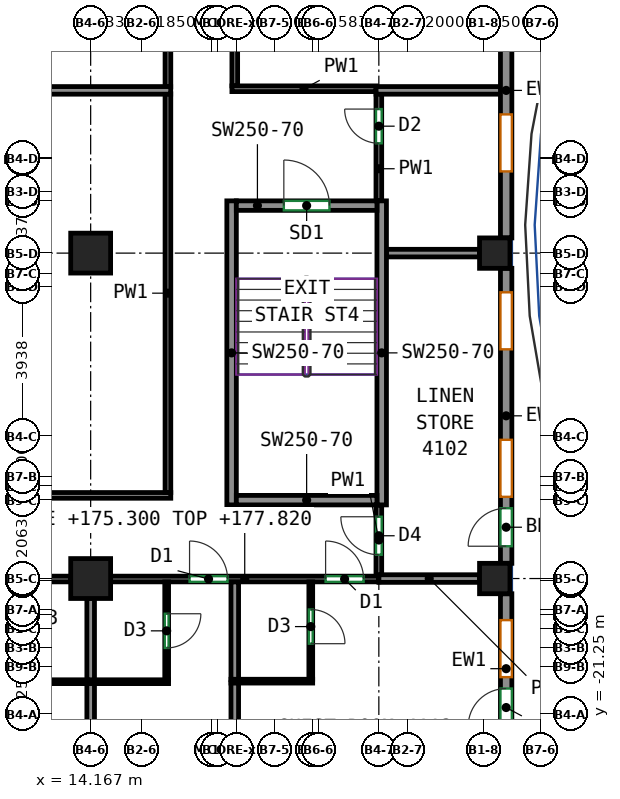
"""IFC4 building model, lengths in metres.
Left out: names, types, materials, properties, quantities, classifications, styles, units other than length and angle.
Written with IfcOpenShell. Run it as: python <this file> out.ifc"""

import sys

from ifc_helpers import new_model, si_unit, direction, frame, frame_2d, origin, origin_2d, place, context, subcontext, project, spatial, rectangle, extrude, source, transform, mapped, element, fill, save


model = new_model("IFC4")
c1 = context("Model", 3, precision=1e-05, world=origin(), true_north=direction((0.0, 1.0)))
c2 = subcontext(c1, "Body", "Model", "MODEL_VIEW")
j1 = project(units=[si_unit("LENGTHUNIT", "METRE"), si_unit("PLANEANGLEUNIT", "RADIAN")], contexts=[c1])
p1 = place(None, origin())
s1 = spatial("IfcSite", under=j1, at=p1, CompositionType="ELEMENT")
p2 = place(p1, origin())
s2 = spatial("IfcBuilding", under=s1, at=p2, CompositionType="ELEMENT")
p3 = place(p2, frame((0.0, 0.0, 175.3)))
s3 = spatial("IfcBuildingStorey", under=s2, at=p3, CompositionType="ELEMENT", Elevation=175.3)
m1 = source(origin(), c2, "Body", "SweptSolid", [
    extrude(rectangle(XDim=1.05, YDim=1.05, at=origin_2d()), origin(), (0.0, 0.0, 1.0), 3.12),
])
for number, where, z_axis, x_axis in (
    (1, (14.167, -17.688, 0.0), (0.0, 0.0, 1.0), (1.0, 0.0, 0.0)),
    (2, (14.167, -9.125, 0.0), (0.0, 0.0, 1.0), (1.0, 0.0, 0.0)),
):
    element("IfcColumn", number, at=place(p3, frame(where, z_axis=z_axis, x_axis=x_axis)), inside=s3, PredefinedType="COLUMN", context=c2, shape_type="MappedRepresentation", body=[
        mapped(m1, transform((0.0, 0.0, 0.0))),
    ])
m2 = source(origin(), c2, "Body", "SweptSolid", [
    extrude(rectangle(XDim=0.8, YDim=0.8, at=origin_2d()), origin(), (0.0, 0.0, 1.0), 3.12),
])
for number, where, z_axis, x_axis in (
    (3, (24.8, -17.688, 0.0), (0.0, 0.0, 1.0), (1.0, 0.0, 0.0)),
    (4, (24.8, -9.125, 0.0), (0.0, 0.0, 1.0), (1.0, 0.0, 0.0)),
):
    element("IfcColumn", number, at=place(p3, frame(where, z_axis=z_axis, x_axis=x_axis)), inside=s3, PredefinedType="COLUMN", context=c2, shape_type="MappedRepresentation", body=[
        mapped(m2, transform((0.0, 0.0, 0.0))),
    ])
m3 = source(origin(), c2, "Body", "SweptSolid", [
    extrude(rectangle(XDim=8.0, YDim=0.25, at=frame_2d((4.0, 0.0))), origin(), (0.0, 0.0, 1.0), 3.12),
])
for number, where, z_axis, x_axis in (
    (5, (17.875, -15.75, 0.0), (0.0, 0.0, 1.0), (0.0, 1.0, 0.0)),
    (6, (21.825, -15.75, 0.0), (0.0, 0.0, 1.0), (0.0, 1.0, 0.0)),
):
    element("IfcWall", number, at=place(p3, frame(where, z_axis=z_axis, x_axis=x_axis)), inside=s3, PredefinedType="SHEAR", context=c2, shape_type="MappedRepresentation", body=[
        mapped(m3, transform((0.0, 0.0, 0.0))),
    ])
m4 = source(origin(), c2, "Body", "SweptSolid", [
    extrude(rectangle(XDim=3.7, YDim=0.25, at=frame_2d((1.85, 0.0))), origin(), (0.0, 0.0, 1.0), 3.12),
])
p4 = place(p3, frame((18.0, -15.625, 0.0), z_axis=(0.0, 0.0, 1.0), x_axis=(1.0, 0.0, 0.0)))
e7 = element("IfcWall", 7, at=p4, inside=s3, PredefinedType="SHEAR", context=c2, shape_type="MappedRepresentation", body=[
    mapped(m4, transform((0.0, 0.0, 0.0))),
])
p5 = place(p3, frame((18.0, -7.875, 0.0), z_axis=(0.0, 0.0, 1.0), x_axis=(1.0, 0.0, 0.0)))
e8 = element("IfcWall", 8, at=p5, inside=s3, PredefinedType="SHEAR", context=c2, shape_type="MappedRepresentation", body=[
    mapped(m4, transform((0.0, 0.0, 0.0))),
])
p6 = place(p5, frame((1.25, 0.0, 0.0)))
e9 = element("IfcOpeningElement", 9, at=p6, cuts=e8, PredefinedType="OPENING", context=c2, shape_type="SweptSolid", body=[
    extrude(rectangle(XDim=1.2, YDim=2.1, at=frame_2d((0.6, 1.05))), frame((0.0, 0.135, 0.0), z_axis=(0.0, -1.0, 0.0), x_axis=(1.0, 0.0, 0.0)), (0.0, 0.0, 1.0), 0.27),
])
m5 = source(origin(), c2, "Body", "SweptSolid", [
    extrude(rectangle(XDim=3.944, YDim=0.3, at=frame_2d((1.972, 0.0))), origin(), (0.0, 0.0, 1.0), 3.12),
])
p7 = place(p3, frame((25.1, -22.032, 0.0), z_axis=(0.0, 0.0, 1.0), x_axis=(0.0, 1.0, 0.0)))
e10 = element("IfcWall", 10, at=p7, inside=s3, PredefinedType="SOLIDWALL", context=c2, shape_type="MappedRepresentation", body=[
    mapped(m5, transform((0.0, 0.0, 0.0))),
])
p8 = place(p7, frame((1.75, 0.0, 0.85)))
e11 = element("IfcOpeningElement", 11, at=p8, cuts=e10, PredefinedType="OPENING", context=c2, shape_type="SweptSolid", body=[
    extrude(rectangle(XDim=1.5, YDim=1.95, at=frame_2d((0.75, 0.975))), frame((0.0, 0.16, 0.0), z_axis=(0.0, -1.0, 0.0), x_axis=(1.0, 0.0, 0.0)), (0.0, 0.0, 1.0), 0.32),
])
p9 = place(p7, frame((0.45, 0.0, 0.0)))
e12 = element("IfcOpeningElement", 12, at=p9, cuts=e10, PredefinedType="OPENING", context=c2, shape_type="SweptSolid", body=[
    extrude(rectangle(XDim=1.0, YDim=2.1, at=frame_2d((0.5, 1.05))), frame((0.0, 0.16, 0.0), z_axis=(0.0, -1.0, 0.0), x_axis=(1.0, 0.0, 0.0)), (0.0, 0.0, 1.0), 0.32),
])
m6 = source(origin(), c2, "Body", "SweptSolid", [
    extrude(rectangle(XDim=7.763, YDim=0.3, at=frame_2d((3.881, 0.0))), origin(), (0.0, 0.0, 1.0), 3.12),
])
p10 = place(p3, frame((25.1, -17.288, 0.0), z_axis=(0.0, 0.0, 1.0), x_axis=(0.0, 1.0, 0.0)))
e13 = element("IfcWall", 13, at=p10, inside=s3, PredefinedType="SOLIDWALL", context=c2, shape_type="MappedRepresentation", body=[
    mapped(m6, transform((0.0, 0.0, 0.0))),
])
p11 = place(p10, frame((1.75, 0.0, 0.85)))
e14 = element("IfcOpeningElement", 14, at=p11, cuts=e13, PredefinedType="OPENING", context=c2, shape_type="SweptSolid", body=[
    extrude(rectangle(XDim=1.5, YDim=1.95, at=frame_2d((0.75, 0.975))), frame((0.0, 0.16, 0.0), z_axis=(0.0, -1.0, 0.0), x_axis=(1.0, 0.0, 0.0)), (0.0, 0.0, 1.0), 0.32),
])
p12 = place(p10, frame((0.45, 0.0, 0.0)))
e15 = element("IfcOpeningElement", 15, at=p12, cuts=e13, PredefinedType="OPENING", context=c2, shape_type="SweptSolid", body=[
    extrude(rectangle(XDim=1.0, YDim=2.1, at=frame_2d((0.5, 1.05))), frame((0.0, 0.16, 0.0), z_axis=(0.0, -1.0, 0.0), x_axis=(1.0, 0.0, 0.0)), (0.0, 0.0, 1.0), 0.32),
])
p13 = place(p10, frame((5.631, 0.0, 0.85)))
e16 = element("IfcOpeningElement", 16, at=p13, cuts=e13, PredefinedType="OPENING", context=c2, shape_type="SweptSolid", body=[
    extrude(rectangle(XDim=1.5, YDim=1.95, at=frame_2d((0.75, 0.975))), frame((0.0, 0.16, 0.0), z_axis=(0.0, -1.0, 0.0), x_axis=(1.0, 0.0, 0.0)), (0.0, 0.0, 1.0), 0.32),
])
p14 = place(p3, frame((25.1, -8.725, 0.0), z_axis=(0.0, 0.0, 1.0), x_axis=(0.0, 1.0, 0.0)))
e17 = element("IfcWall", 17, at=p14, inside=s3, PredefinedType="SOLIDWALL", context=c2, shape_type="MappedRepresentation", body=[
    mapped(m6, transform((0.0, 0.0, 0.0))),
])
p15 = place(p14, frame((1.75, 0.0, 0.85)))
e18 = element("IfcOpeningElement", 18, at=p15, cuts=e17, PredefinedType="OPENING", context=c2, shape_type="SweptSolid", body=[
    extrude(rectangle(XDim=1.5, YDim=1.95, at=frame_2d((0.75, 0.975))), frame((0.0, 0.16, 0.0), z_axis=(0.0, -1.0, 0.0), x_axis=(1.0, 0.0, 0.0)), (0.0, 0.0, 1.0), 0.32),
])
p16 = place(p14, frame((5.631, 0.0, 0.85)))
e19 = element("IfcOpeningElement", 19, at=p16, cuts=e17, PredefinedType="OPENING", context=c2, shape_type="SweptSolid", body=[
    extrude(rectangle(XDim=1.5, YDim=1.95, at=frame_2d((0.75, 0.975))), frame((0.0, 0.16, 0.0), z_axis=(0.0, -1.0, 0.0), x_axis=(1.0, 0.0, 0.0)), (0.0, 0.0, 1.0), 0.32),
])
p17 = place(p3, frame((7.108, -17.7, 0.0), z_axis=(0.0, 0.0, 1.0), x_axis=(1.0, 0.0, 0.0)))
e20 = element("IfcWall", 20, at=p17, inside=s3, PredefinedType="PARTITIONING", context=c2, shape_type="SweptSolid", body=[
    extrude(rectangle(XDim=6.534, YDim=0.15, at=frame_2d((3.267, 0.0))), origin(), (0.0, 0.0, 1.0), 3.12),
])
p18 = place(p17, frame((1.974, 0.0, 0.0)))
e21 = element("IfcOpeningElement", 21, at=p18, cuts=e20, PredefinedType="OPENING", context=c2, shape_type="SweptSolid", body=[
    extrude(rectangle(XDim=1.0, YDim=2.1, at=frame_2d((0.5, 1.05))), frame((0.0, 0.085, 0.0), z_axis=(0.0, -1.0, 0.0), x_axis=(1.0, 0.0, 0.0)), (0.0, 0.0, 1.0), 0.17),
])
p19 = place(p17, frame((3.766, 0.0, 0.0)))
e22 = element("IfcOpeningElement", 22, at=p19, cuts=e20, PredefinedType="OPENING", context=c2, shape_type="SweptSolid", body=[
    extrude(rectangle(XDim=1.0, YDim=2.1, at=frame_2d((0.5, 1.05))), frame((0.0, 0.085, 0.0), z_axis=(0.0, -1.0, 0.0), x_axis=(1.0, 0.0, 0.0)), (0.0, 0.0, 1.0), 0.17),
])
p20 = place(p3, frame((14.692, -17.7, 0.0), z_axis=(0.0, 0.0, 1.0), x_axis=(1.0, 0.0, 0.0)))
e23 = element("IfcWall", 23, at=p20, inside=s3, PredefinedType="PARTITIONING", context=c2, shape_type="SweptSolid", body=[
    extrude(rectangle(XDim=7.058, YDim=0.15, at=frame_2d((3.529, 0.0))), origin(), (0.0, 0.0, 1.0), 2.52),
])
p21 = place(p20, frame((2.077, 0.0, 0.0)))
e24 = element("IfcOpeningElement", 24, at=p21, cuts=e23, PredefinedType="OPENING", context=c2, shape_type="SweptSolid", body=[
    extrude(rectangle(XDim=1.0, YDim=2.1, at=frame_2d((0.5, 1.05))), frame((0.0, 0.085, 0.0), z_axis=(0.0, -1.0, 0.0), x_axis=(1.0, 0.0, 0.0)), (0.0, 0.0, 1.0), 0.17),
])
p22 = place(p20, frame((5.657, 0.0, 0.0)))
e25 = element("IfcOpeningElement", 25, at=p22, cuts=e23, PredefinedType="OPENING", context=c2, shape_type="SweptSolid", body=[
    extrude(rectangle(XDim=1.0, YDim=2.1, at=frame_2d((0.5, 1.05))), frame((0.0, 0.085, 0.0), z_axis=(0.0, -1.0, 0.0), x_axis=(1.0, 0.0, 0.0)), (0.0, 0.0, 1.0), 0.17),
])
p23 = place(p3, frame((17.959, -4.725, 0.0), z_axis=(0.0, 0.0, 1.0), x_axis=(0.0, 1.0, 0.0)))
e26 = element("IfcWall", 26, at=p23, inside=s3, PredefinedType="PARTITIONING", context=c2, shape_type="SweptSolid", body=[
    extrude(rectangle(XDim=8.35, YDim=0.15, at=frame_2d((4.175, 0.0))), origin(), (0.0, 0.0, 1.0), 3.12),
])
p24 = place(p23, frame((6.444, 0.0, 0.0)))
e27 = element("IfcOpeningElement", 27, at=p24, cuts=e26, PredefinedType="OPENING", context=c2, shape_type="SweptSolid", body=[
    extrude(rectangle(XDim=0.9, YDim=2.1, at=frame_2d((0.45, 1.05))), frame((0.0, 0.085, 0.0), z_axis=(0.0, -1.0, 0.0), x_axis=(1.0, 0.0, 0.0)), (0.0, 0.0, 1.0), 0.17),
])
p25 = place(p3, frame((17.884, -4.8, 0.0), z_axis=(0.0, 0.0, 1.0), x_axis=(1.0, 0.0, 0.0)))
e28 = element("IfcWall", 28, at=p25, inside=s3, PredefinedType="PARTITIONING", context=c2, shape_type="SweptSolid", body=[
    extrude(rectangle(XDim=3.793, YDim=0.15, at=frame_2d((1.896, 0.0))), origin(), (0.0, 0.0, 1.0), 3.12),
])
p26 = place(p3, frame((21.75, -7.75, 0.0), z_axis=(0.0, 0.0, 1.0), x_axis=(0.0, 1.0, 0.0)))
e29 = element("IfcWall", 29, at=p26, inside=s3, PredefinedType="PARTITIONING", context=c2, shape_type="SweptSolid", body=[
    extrude(rectangle(XDim=2.817, YDim=0.15, at=frame_2d((1.408, 0.0))), origin(), (0.0, 0.0, 1.0), 3.12),
])
p27 = place(p26, frame((1.515, 0.0, 0.0)))
e30 = element("IfcOpeningElement", 30, at=p27, cuts=e29, PredefinedType="OPENING", context=c2, shape_type="SweptSolid", body=[
    extrude(rectangle(XDim=0.9, YDim=2.1, at=frame_2d((0.45, 1.05))), frame((0.0, 0.085, 0.0), z_axis=(0.0, -1.0, 0.0), x_axis=(1.0, 0.0, 0.0)), (0.0, 0.0, 1.0), 0.17),
])
p28 = place(p3, frame((21.75, -17.598, 0.0), z_axis=(0.0, 0.0, 1.0), x_axis=(0.0, 1.0, 0.0)))
e31 = element("IfcWall", 31, at=p28, inside=s3, PredefinedType="PARTITIONING", context=c2, shape_type="SweptSolid", body=[
    extrude(rectangle(XDim=1.848, YDim=0.15, at=frame_2d((0.924, 0.0))), origin(), (0.0, 0.0, 1.0), 3.12),
])
p29 = place(p28, frame((0.536, 0.0, 0.0)))
e32 = element("IfcOpeningElement", 32, at=p29, cuts=e31, PredefinedType="OPENING", context=c2, shape_type="SweptSolid", body=[
    extrude(rectangle(XDim=1.0, YDim=2.1, at=frame_2d((0.5, 1.05))), frame((0.0, 0.085, 0.0), z_axis=(0.0, -1.0, 0.0), x_axis=(1.0, 0.0, 0.0)), (0.0, 0.0, 1.0), 0.17),
])
p30 = place(p3, frame((16.2, -4.753, 0.0), z_axis=(0.0, 0.0, 1.0), x_axis=(0.0, 1.0, 0.0)))
e33 = element("IfcWall", 33, at=p30, inside=s3, PredefinedType="PARTITIONING", context=c2, shape_type="SweptSolid", body=[
    extrude(rectangle(XDim=8.378, YDim=0.15, at=frame_2d((4.189, 0.0))), origin(), (0.0, 0.0, 1.0), 3.12),
])
p31 = place(p3, frame((-8.593, -15.5, 0.0), z_axis=(0.0, 0.0, 1.0), x_axis=(1.0, 0.0, 0.0)))
e34 = element("IfcWall", 34, at=p31, inside=s3, PredefinedType="PARTITIONING", context=c2, shape_type="SweptSolid", body=[
    extrude(rectangle(XDim=24.868, YDim=0.15, at=frame_2d((12.434, 0.0))), origin(), (0.0, 0.0, 1.0), 3.12),
])
p32 = place(p31, frame((6.44, 0.0, 0.0)))
e35 = element("IfcOpeningElement", 35, at=p32, cuts=e34, PredefinedType="OPENING", context=c2, shape_type="SweptSolid", body=[
    extrude(rectangle(XDim=0.9, YDim=2.1, at=frame_2d((0.45, 1.05))), frame((0.0, 0.085, 0.0), z_axis=(0.0, -1.0, 0.0), x_axis=(1.0, 0.0, 0.0)), (0.0, 0.0, 1.0), 0.17),
])
p33 = place(p31, frame((16.43, 0.0, 0.0)))
e36 = element("IfcOpeningElement", 36, at=p33, cuts=e34, PredefinedType="OPENING", context=c2, shape_type="SweptSolid", body=[
    extrude(rectangle(XDim=0.9, YDim=2.1, at=frame_2d((0.45, 1.05))), frame((0.0, 0.085, 0.0), z_axis=(0.0, -1.0, 0.0), x_axis=(1.0, 0.0, 0.0)), (0.0, 0.0, 1.0), 0.17),
])
p34 = place(p3, frame((16.2, -15.425, 0.0), z_axis=(0.0, 0.0, 1.0), x_axis=(0.0, 1.0, 0.0)))
e37 = element("IfcWall", 37, at=p34, inside=s3, PredefinedType="PARTITIONING", context=c2, shape_type="SweptSolid", body=[
    extrude(rectangle(XDim=10.492, YDim=0.15, at=frame_2d((5.246, 0.0))), origin(), (0.0, 0.0, 1.0), 3.12),
])
p35 = place(p3, frame((12.117, -20.402, 0.0), z_axis=(0.0, 0.0, 1.0), x_axis=(1.0, 0.0, 0.0)))
e38 = element("IfcWall", 38, at=p35, inside=s3, PredefinedType="PARTITIONING", context=c2, shape_type="SweptSolid", body=[
    extrude(rectangle(XDim=4.1, YDim=0.1, at=frame_2d((2.05, 0.0))), origin(), (0.0, 0.0, 1.0), 3.12),
])
p36 = place(p3, frame((14.167, -25.4, 0.0), z_axis=(0.0, 0.0, 1.0), x_axis=(0.0, 1.0, 0.0)))
e39 = element("IfcWall", 39, at=p36, inside=s3, PredefinedType="PARTITIONING", context=c2, shape_type="SweptSolid", body=[
    extrude(rectangle(XDim=4.948, YDim=0.2, at=frame_2d((2.474, 0.0))), origin(), (0.0, 0.0, 1.0), 3.12),
])
p37 = place(p3, frame((14.167, -20.352, 0.0), z_axis=(0.0, 0.0, 1.0), x_axis=(0.0, 1.0, 0.0)))
e40 = element("IfcWall", 40, at=p37, inside=s3, PredefinedType="PARTITIONING", context=c2, shape_type="SweptSolid", body=[
    extrude(rectangle(XDim=2.14, YDim=0.2, at=frame_2d((1.07, 0.0))), origin(), (0.0, 0.0, 1.0), 3.12),
])
p38 = place(p3, frame((16.167, -17.777, 0.0), z_axis=(0.0, 0.0, 1.0), x_axis=(0.0, -1.0, 0.0)))
e41 = element("IfcWall", 41, at=p38, inside=s3, PredefinedType="PARTITIONING", context=c2, shape_type="SweptSolid", body=[
    extrude(rectangle(XDim=2.575, YDim=0.1, at=frame_2d((1.288, 0.0))), origin(), (0.0, 0.0, 1.0), 3.12),
])
p39 = place(p38, frame((0.837, 0.0, 0.0)))
e42 = element("IfcOpeningElement", 42, at=p39, cuts=e41, PredefinedType="OPENING", context=c2, shape_type="SweptSolid", body=[
    extrude(rectangle(XDim=0.9, YDim=2.1, at=frame_2d((0.45, 1.05))), frame((0.0, 0.06, 0.0), z_axis=(0.0, -1.0, 0.0), x_axis=(1.0, 0.0, 0.0)), (0.0, 0.0, 1.0), 0.12),
])
p40 = place(p3, frame((17.959, -26.0, 0.0), z_axis=(0.0, 0.0, 1.0), x_axis=(0.0, 1.0, 0.0)))
e43 = element("IfcWall", 43, at=p40, inside=s3, PredefinedType="PARTITIONING", context=c2, shape_type="SweptSolid", body=[
    extrude(rectangle(XDim=5.572, YDim=0.2, at=frame_2d((2.786, 0.0))), origin(), (0.0, 0.0, 1.0), 3.12),
])
p41 = place(p3, frame((17.959, -20.348, 0.0), z_axis=(0.0, 0.0, 1.0), x_axis=(0.0, 1.0, 0.0)))
e44 = element("IfcWall", 44, at=p41, inside=s3, PredefinedType="PARTITIONING", context=c2, shape_type="SweptSolid", body=[
    extrude(rectangle(XDim=2.571, YDim=0.2, at=frame_2d((1.285, 0.0))), origin(), (0.0, 0.0, 1.0), 3.12),
])
p42 = place(p3, frame((17.859, -20.388, 0.0), z_axis=(0.0, 0.0, 1.0), x_axis=(1.0, 0.0, 0.0)))
e45 = element("IfcWall", 45, at=p42, inside=s3, PredefinedType="PARTITIONING", context=c2, shape_type="SweptSolid", body=[
    extrude(rectangle(XDim=2.15, YDim=0.1, at=frame_2d((1.075, 0.0))), origin(), (0.0, 0.0, 1.0), 3.12),
])
p43 = place(p3, frame((19.959, -17.777, 0.0), z_axis=(0.0, 0.0, 1.0), x_axis=(0.0, -1.0, 0.0)))
e46 = element("IfcWall", 46, at=p43, inside=s3, PredefinedType="PARTITIONING", context=c2, shape_type="SweptSolid", body=[
    extrude(rectangle(XDim=2.561, YDim=0.1, at=frame_2d((1.28, 0.0))), origin(), (0.0, 0.0, 1.0), 3.12),
])
p44 = place(p43, frame((0.725, 0.0, 0.0)))
e47 = element("IfcOpeningElement", 47, at=p44, cuts=e46, PredefinedType="OPENING", context=c2, shape_type="SweptSolid", body=[
    extrude(rectangle(XDim=0.9, YDim=2.1, at=frame_2d((0.45, 1.05))), frame((0.0, 0.06, 0.0), z_axis=(0.0, -1.0, 0.0), x_axis=(1.0, 0.0, 0.0)), (0.0, 0.0, 1.0), 0.12),
])
p45 = place(p3, frame((21.752, -17.688, 0.0), z_axis=(0.0, 0.0, 1.0), x_axis=(1.0, 0.0, 0.0)))
e48 = element("IfcWall", 48, at=p45, inside=s3, PredefinedType="PARTITIONING", context=c2, shape_type="SweptSolid", body=[
    extrude(rectangle(XDim=2.648, YDim=0.2, at=frame_2d((1.324, 0.0))), origin(), (0.0, 0.0, 1.0), 2.52),
])
p46 = place(p3, frame((21.677, -4.843, 0.0), z_axis=(0.0, 0.0, 1.0), x_axis=(1.0, 0.0, 0.0)))
e49 = element("IfcWall", 49, at=p46, inside=s3, PredefinedType="PARTITIONING", context=c2, shape_type="SweptSolid", body=[
    extrude(rectangle(XDim=3.323, YDim=0.2, at=frame_2d((1.662, 0.0))), origin(), (0.0, 0.0, 1.0), 3.12),
])
p47 = place(p3, frame((21.95, -9.125, 0.0), z_axis=(0.0, 0.0, 1.0), x_axis=(1.0, 0.0, 0.0)))
e50 = element("IfcWall", 50, at=p47, inside=s3, PredefinedType="PARTITIONING", context=c2, shape_type="SweptSolid", body=[
    extrude(rectangle(XDim=2.45, YDim=0.2, at=frame_2d((1.225, 0.0))), origin(), (0.0, 0.0, 1.0), 3.12),
])
p48 = place(p3, frame((-13.873, -4.843, 0.0), z_axis=(0.0, 0.0, 1.0), x_axis=(1.0, 0.0, 0.0)))
e51 = element("IfcWall", 51, at=p48, inside=s3, PredefinedType="PARTITIONING", context=c2, shape_type="SweptSolid", body=[
    extrude(rectangle(XDim=30.146, YDim=0.2, at=frame_2d((15.073, 0.0))), origin(), (0.0, 0.0, 1.0), 3.12),
])
p49 = place(p8, origin())
e52 = element("IfcWindow", 52, at=p49, inside=s3, PartitioningType="SINGLE_PANEL", PredefinedType="WINDOW", context=c2, shape_type="SweptSolid", body=[
    extrude(rectangle(XDim=1.5, YDim=1.95, at=frame_2d((0.75, 0.975))), frame((0.0, 0.03, 0.0), z_axis=(0.0, -1.0, 0.0), x_axis=(1.0, 0.0, 0.0)), (0.0, 0.0, 1.0), 0.06),
])
fill(e11, e52)
p50 = place(p9, origin())
e53 = element("IfcDoor", 53, at=p50, inside=s3, OperationType="SINGLE_SWING_LEFT", PredefinedType="DOOR", context=c2, shape_type="SweptSolid", body=[
    extrude(rectangle(XDim=1.0, YDim=2.1, at=frame_2d((0.5, 1.05))), frame((0.0, 0.025, 0.0), z_axis=(0.0, -1.0, 0.0), x_axis=(1.0, 0.0, 0.0)), (0.0, 0.0, 1.0), 0.05),
])
fill(e12, e53)
p51 = place(p11, origin())
e54 = element("IfcWindow", 54, at=p51, inside=s3, PartitioningType="SINGLE_PANEL", PredefinedType="WINDOW", context=c2, shape_type="SweptSolid", body=[
    extrude(rectangle(XDim=1.5, YDim=1.95, at=frame_2d((0.75, 0.975))), frame((0.0, 0.03, 0.0), z_axis=(0.0, -1.0, 0.0), x_axis=(1.0, 0.0, 0.0)), (0.0, 0.0, 1.0), 0.06),
])
fill(e14, e54)
p52 = place(p12, origin())
e55 = element("IfcDoor", 55, at=p52, inside=s3, OperationType="SINGLE_SWING_LEFT", PredefinedType="DOOR", context=c2, shape_type="SweptSolid", body=[
    extrude(rectangle(XDim=1.0, YDim=2.1, at=frame_2d((0.5, 1.05))), frame((0.0, 0.025, 0.0), z_axis=(0.0, -1.0, 0.0), x_axis=(1.0, 0.0, 0.0)), (0.0, 0.0, 1.0), 0.05),
])
fill(e15, e55)
p53 = place(p13, origin())
e56 = element("IfcWindow", 56, at=p53, inside=s3, PartitioningType="SINGLE_PANEL", PredefinedType="WINDOW", context=c2, shape_type="SweptSolid", body=[
    extrude(rectangle(XDim=1.5, YDim=1.95, at=frame_2d((0.75, 0.975))), frame((0.0, 0.03, 0.0), z_axis=(0.0, -1.0, 0.0), x_axis=(1.0, 0.0, 0.0)), (0.0, 0.0, 1.0), 0.06),
])
fill(e16, e56)
p54 = place(p15, origin())
e57 = element("IfcWindow", 57, at=p54, inside=s3, PartitioningType="SINGLE_PANEL", PredefinedType="WINDOW", context=c2, shape_type="SweptSolid", body=[
    extrude(rectangle(XDim=1.5, YDim=1.95, at=frame_2d((0.75, 0.975))), frame((0.0, 0.03, 0.0), z_axis=(0.0, -1.0, 0.0), x_axis=(1.0, 0.0, 0.0)), (0.0, 0.0, 1.0), 0.06),
])
fill(e18, e57)
p55 = place(p6, origin())
e58 = element("IfcDoor", 58, at=p55, inside=s3, OperationType="DOUBLE_DOOR_SINGLE_SWING", PredefinedType="DOOR", context=c2, shape_type="SweptSolid", body=[
    extrude(rectangle(XDim=1.2, YDim=2.1, at=frame_2d((0.6, 1.05))), frame((0.0, 0.025, 0.0), z_axis=(0.0, -1.0, 0.0), x_axis=(1.0, 0.0, 0.0)), (0.0, 0.0, 1.0), 0.05),
])
fill(e9, e58)
p56 = place(p39, origin())
e59 = element("IfcDoor", 59, at=p56, inside=s3, OperationType="SINGLE_SWING_LEFT", PredefinedType="DOOR", context=c2, shape_type="SweptSolid", body=[
    extrude(rectangle(XDim=0.9, YDim=2.1, at=frame_2d((0.45, 1.05))), frame((0.0, 0.025, 0.0), z_axis=(0.0, -1.0, 0.0), x_axis=(1.0, 0.0, 0.0)), (0.0, 0.0, 1.0), 0.05),
])
fill(e42, e59)
p57 = place(p44, origin())
e60 = element("IfcDoor", 60, at=p57, inside=s3, OperationType="SINGLE_SWING_RIGHT", PredefinedType="DOOR", context=c2, shape_type="SweptSolid", body=[
    extrude(rectangle(XDim=0.9, YDim=2.1, at=frame_2d((0.45, 1.05))), frame((0.0, 0.025, 0.0), z_axis=(0.0, -1.0, 0.0), x_axis=(1.0, 0.0, 0.0)), (0.0, 0.0, 1.0), 0.05),
])
fill(e47, e60)
p58 = place(p21, origin())
e61 = element("IfcDoor", 61, at=p58, inside=s3, OperationType="SINGLE_SWING_LEFT", PredefinedType="DOOR", context=c2, shape_type="SweptSolid", body=[
    extrude(rectangle(XDim=1.0, YDim=2.1, at=frame_2d((0.5, 1.05))), frame((0.0, 0.025, 0.0), z_axis=(0.0, -1.0, 0.0), x_axis=(1.0, 0.0, 0.0)), (0.0, 0.0, 1.0), 0.05),
])
fill(e24, e61)
p59 = place(p22, origin())
e62 = element("IfcDoor", 62, at=p59, inside=s3, OperationType="SINGLE_SWING_LEFT", PredefinedType="DOOR", context=c2, shape_type="SweptSolid", body=[
    extrude(rectangle(XDim=1.0, YDim=2.1, at=frame_2d((0.5, 1.05))), frame((0.0, 0.025, 0.0), z_axis=(0.0, -1.0, 0.0), x_axis=(1.0, 0.0, 0.0)), (0.0, 0.0, 1.0), 0.05),
])
fill(e25, e62)
p60 = place(p29, origin())
e63 = element("IfcDoor", 63, at=p60, inside=s3, OperationType="SINGLE_SWING_RIGHT", PredefinedType="DOOR", context=c2, shape_type="SweptSolid", body=[
    extrude(rectangle(XDim=1.0, YDim=2.1, at=frame_2d((0.5, 1.05))), frame((0.0, 0.025, 0.0), z_axis=(0.0, -1.0, 0.0), x_axis=(1.0, 0.0, 0.0)), (0.0, 0.0, 1.0), 0.05),
])
fill(e32, e63)
p61 = place(p27, origin())
e64 = element("IfcDoor", 64, at=p61, inside=s3, OperationType="SINGLE_SWING_RIGHT", PredefinedType="DOOR", context=c2, shape_type="SweptSolid", body=[
    extrude(rectangle(XDim=0.9, YDim=2.1, at=frame_2d((0.45, 1.05))), frame((0.0, 0.025, 0.0), z_axis=(0.0, -1.0, 0.0), x_axis=(1.0, 0.0, 0.0)), (0.0, 0.0, 1.0), 0.05),
])
fill(e30, e64)
save(model, sys.argv[1])
